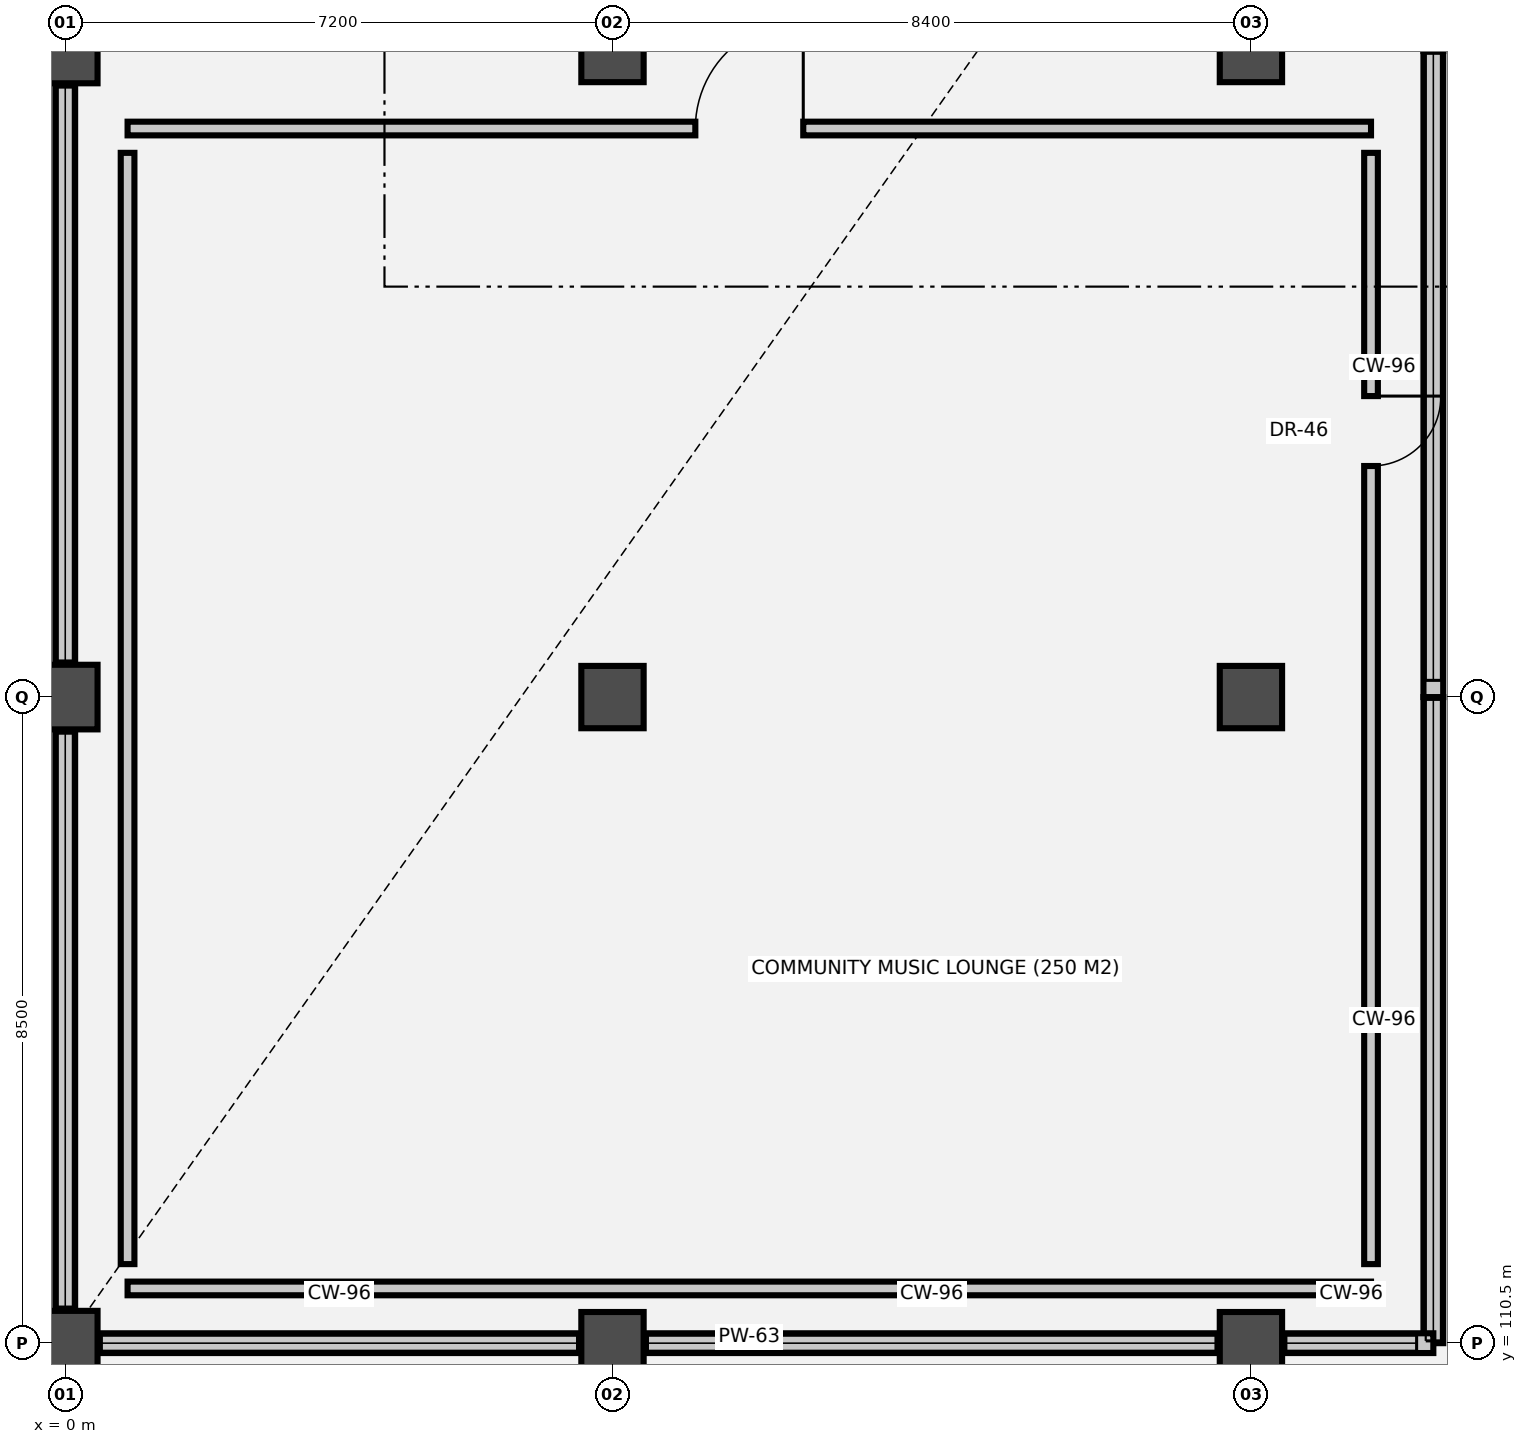
"""IFC4 building model, lengths in metres.
Left out: names, types, materials, properties, quantities, classifications, styles, units other than length and angle.
Written with IfcOpenShell. Run it as: python <this file> out.ifc"""

import sys

from ifc_helpers import new_model, si_unit, direction, frame, frame_2d, origin, origin_2d, place, context, subcontext, project, spatial, rectangle, circle, extrude, element, fill, save


model = new_model("IFC4")
c1 = context("Model", 3, precision=1e-05, world=origin(), true_north=direction((0.0, 1.0)))
c2 = subcontext(c1, "Body", "Model", "MODEL_VIEW")
j1 = project(units=[si_unit("LENGTHUNIT", "METRE"), si_unit("PLANEANGLEUNIT", "RADIAN")], contexts=[c1])
p1 = place(None, origin())
s1 = spatial("IfcSite", under=j1, at=p1, CompositionType="ELEMENT")
p2 = place(p1, origin())
s2 = spatial("IfcBuilding", under=s1, at=p2, CompositionType="ELEMENT")
p3 = place(p2, origin())
s3 = spatial("IfcBuildingStorey", under=s2, at=p3, CompositionType="ELEMENT", Elevation=0.0)
for number, where, z_axis, x_axis in (
    (1, (0.0, 110.5, 0.0), (0.0, 0.0, 1.0), (1.0, 0.0, 0.0)),
    (2, (0.0, 119.0, 0.0), (0.0, 0.0, 1.0), (1.0, 0.0, 0.0)),
    (3, (0.0, 127.5, 0.0), (0.0, 0.0, 1.0), (1.0, 0.0, 0.0)),
):
    element("IfcColumn", number, at=place(p3, frame(where, z_axis=z_axis, x_axis=x_axis)), inside=s3, PredefinedType="COLUMN", context=c2, shape_type="SweptSolid", body=[
        extrude(circle(Radius=0.425, at=origin_2d()), origin(), (0.0, 0.0, 1.0), 5.4),
    ])
for number, where, z_axis, x_axis in (
    (4, (7.2, 110.5, 0.0), (0.0, 0.0, 1.0), (1.0, 0.0, 0.0)),
    (5, (7.2, 119.0, 0.0), (0.0, 0.0, 1.0), (1.0, 0.0, 0.0)),
    (6, (7.2, 127.5, 0.0), (0.0, 0.0, 1.0), (1.0, 0.0, 0.0)),
    (7, (15.6, 110.5, 0.0), (0.0, 0.0, 1.0), (1.0, 0.0, 0.0)),
    (8, (15.6, 119.0, 0.0), (0.0, 0.0, 1.0), (1.0, 0.0, 0.0)),
    (9, (15.6, 127.5, 0.0), (0.0, 0.0, 1.0), (1.0, 0.0, 0.0)),
):
    element("IfcColumn", number, at=place(p3, frame(where, z_axis=z_axis, x_axis=x_axis)), inside=s3, PredefinedType="COLUMN", context=c2, shape_type="SweptSolid", body=[
        extrude(rectangle(XDim=0.82, YDim=0.82, at=origin_2d()), origin(), (0.0, 0.0, 1.0), 5.4),
    ])
for number, where, z_axis, x_axis in (
    (10, (18.0, 119.0, 0.0), (0.0, 0.0, 1.0), (0.0, -1.0, 0.0)),
    (11, (18.0, 127.5, 0.0), (0.0, 0.0, 1.0), (0.0, -1.0, 0.0)),
):
    element("IfcWall", number, at=place(p3, frame(where, z_axis=z_axis, x_axis=x_axis)), inside=s3, PredefinedType="PARAPET", context=c2, shape_type="SweptSolid", body=[
        extrude(rectangle(XDim=8.5, YDim=0.26, at=frame_2d((4.25, 0.0))), origin(), (0.0, 0.0, 1.0), 1.12),
    ])
p4 = place(p3, frame((6.77, 110.5, 0.0), z_axis=(0.0, 0.0, 1.0), x_axis=(-1.0, 0.0, 0.0)))
e12 = element("IfcWall", 12, at=p4, inside=s3, PredefinedType="PARAPET", context=c2, shape_type="SweptSolid", body=[
    extrude(rectangle(XDim=6.325, YDim=0.26, at=frame_2d((3.163, 0.0))), origin(), (0.0, 0.0, 1.0), 1.12),
])
p5 = place(p3, frame((15.17, 110.5, 0.0), z_axis=(0.0, 0.0, 1.0), x_axis=(-1.0, 0.0, 0.0)))
e13 = element("IfcWall", 13, at=p5, inside=s3, PredefinedType="PARAPET", context=c2, shape_type="SweptSolid", body=[
    extrude(rectangle(XDim=7.54, YDim=0.26, at=frame_2d((3.77, 0.0))), origin(), (0.0, 0.0, 1.0), 1.12),
])
p6 = place(p3, frame((18.0, 110.5, 0.0), z_axis=(0.0, 0.0, 1.0), x_axis=(-1.0, 0.0, 0.0)))
e14 = element("IfcWall", 14, at=p6, inside=s3, PredefinedType="PARAPET", context=c2, shape_type="SweptSolid", body=[
    extrude(rectangle(XDim=1.97, YDim=0.26, at=frame_2d((0.985, 0.0))), origin(), (0.0, 0.0, 1.0), 1.12),
])
for number, where, z_axis, x_axis in (
    (15, (0.0, 110.945, 0.0), (0.0, 0.0, 1.0), (0.0, 1.0, 0.0)),
    (16, (0.0, 119.445, 0.0), (0.0, 0.0, 1.0), (0.0, 1.0, 0.0)),
):
    element("IfcWall", number, at=place(p3, frame(where, z_axis=z_axis, x_axis=x_axis)), inside=s3, PredefinedType="PARAPET", context=c2, shape_type="SweptSolid", body=[
        extrude(rectangle(XDim=7.61, YDim=0.26, at=frame_2d((3.805, 0.0))), origin(), (0.0, 0.0, 1.0), 1.12),
    ])
p7 = place(p3, frame((0.82, 126.48, 0.0), z_axis=(0.0, 0.0, 1.0), x_axis=(1.0, 0.0, 0.0)))
e17 = element("IfcWall", 17, at=p7, inside=s3, PredefinedType="PARTITIONING", context=c2, shape_type="SweptSolid", body=[
    extrude(rectangle(XDim=16.36, YDim=0.18, at=frame_2d((8.18, 0.0))), origin(), (0.0, 0.0, 1.0), 4.04),
])
p8 = place(p7, frame((7.47, 0.0, 0.0)))
e18 = element("IfcOpeningElement", 18, at=p8, cuts=e17, PredefinedType="OPENING", context=c2, shape_type="SweptSolid", body=[
    extrude(rectangle(XDim=1.42, YDim=2.34, at=frame_2d((0.71, 1.17))), frame((0.0, 0.1, 0.0), z_axis=(0.0, -1.0, 0.0), x_axis=(1.0, 0.0, 0.0)), (0.0, 0.0, 1.0), 0.2),
])
p9 = place(p3, frame((17.18, 111.22, 0.0), z_axis=(0.0, 0.0, 1.0), x_axis=(-1.0, 0.0, 0.0)))
e19 = element("IfcWall", 19, at=p9, inside=s3, PredefinedType="PARTITIONING", context=c2, shape_type="SweptSolid", body=[
    extrude(rectangle(XDim=16.36, YDim=0.18, at=frame_2d((8.18, 0.0))), origin(), (0.0, 0.0, 1.0), 4.04),
])
p10 = place(p3, frame((17.18, 126.16, 0.0), z_axis=(0.0, 0.0, 1.0), x_axis=(0.0, -1.0, 0.0)))
e20 = element("IfcWall", 20, at=p10, inside=s3, PredefinedType="PARTITIONING", context=c2, shape_type="SweptSolid", body=[
    extrude(rectangle(XDim=14.62, YDim=0.18, at=frame_2d((7.31, 0.0))), origin(), (0.0, 0.0, 1.0), 4.04),
])
p11 = place(p10, frame((3.2, 0.0, 0.0)))
e21 = element("IfcOpeningElement", 21, at=p11, cuts=e20, PredefinedType="OPENING", context=c2, shape_type="SweptSolid", body=[
    extrude(rectangle(XDim=0.92, YDim=2.12, at=frame_2d((0.46, 1.06))), frame((0.0, 0.1, 0.0), z_axis=(0.0, -1.0, 0.0), x_axis=(1.0, 0.0, 0.0)), (0.0, 0.0, 1.0), 0.2),
])
p12 = place(p3, frame((0.82, 111.54, 0.0), z_axis=(0.0, 0.0, 1.0), x_axis=(0.0, 1.0, 0.0)))
e22 = element("IfcWall", 22, at=p12, inside=s3, PredefinedType="PARTITIONING", context=c2, shape_type="SweptSolid", body=[
    extrude(rectangle(XDim=14.62, YDim=0.18, at=frame_2d((7.31, 0.0))), origin(), (0.0, 0.0, 1.0), 4.04),
])
p13 = place(p8, origin())
e23 = element("IfcDoor", 23, at=p13, inside=s3, OperationType="SINGLE_SWING_RIGHT", PredefinedType="DOOR", context=c2, shape_type="SweptSolid", body=[
    extrude(rectangle(XDim=1.42, YDim=2.34, at=frame_2d((0.71, 1.17))), frame((0.0, 0.025, 0.0), z_axis=(0.0, -1.0, 0.0), x_axis=(1.0, 0.0, 0.0)), (0.0, 0.0, 1.0), 0.05),
])
fill(e18, e23)
p14 = place(p11, origin())
e24 = element("IfcDoor", 24, at=p14, inside=s3, OperationType="SINGLE_SWING_LEFT", PredefinedType="DOOR", context=c2, shape_type="SweptSolid", body=[
    extrude(rectangle(XDim=0.92, YDim=2.12, at=frame_2d((0.46, 1.06))), frame((0.0, 0.025, 0.0), z_axis=(0.0, -1.0, 0.0), x_axis=(1.0, 0.0, 0.0)), (0.0, 0.0, 1.0), 0.05),
])
fill(e21, e24)
save(model, sys.argv[1])
